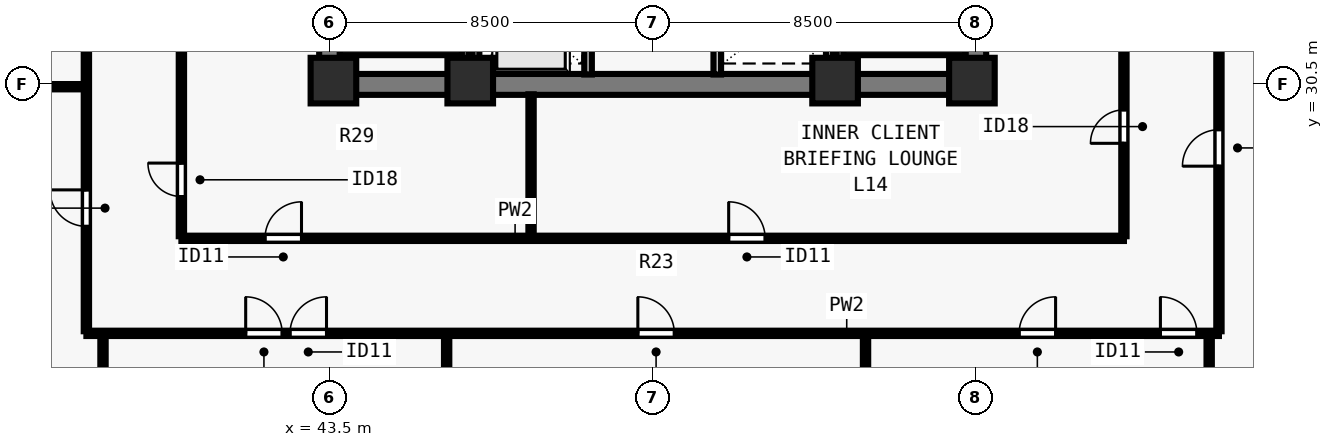
"""IFC4 building model, lengths in metres.
Left out: names, types, materials, properties, quantities, classifications, styles, units other than length and angle.
Written with IfcOpenShell. Run it as: python <this file> out.ifc"""

import sys

from ifc_helpers import new_model, si_unit, direction, frame, frame_2d, origin, origin_2d, place, context, subcontext, project, spatial, rectangle, extrude, element, fill, save


model = new_model("IFC4")
c1 = context("Model", 3, precision=1e-05, world=origin(), true_north=direction((0.0, 1.0)))
c2 = subcontext(c1, "Body", "Model", "MODEL_VIEW")
j1 = project(units=[si_unit("LENGTHUNIT", "METRE"), si_unit("PLANEANGLEUNIT", "RADIAN")], contexts=[c1])
p1 = place(None, origin())
s1 = spatial("IfcSite", under=j1, at=p1, CompositionType="ELEMENT")
p2 = place(p1, origin())
s2 = spatial("IfcBuilding", under=s1, at=p2, CompositionType="ELEMENT")
p3 = place(p2, frame((0.0, 0.0, 55.0)))
s3 = spatial("IfcBuildingStorey", under=s2, at=p3, CompositionType="ELEMENT", Elevation=55.0)
for number, where, z_axis, x_axis in (
    (1, (43.6, 30.6, 0.0), (0.0, 0.0, 1.0), (1.0, 0.0, 0.0)),
    (2, (47.2, 30.6, 0.0), (0.0, 0.0, 1.0), (1.0, 0.0, 0.0)),
    (3, (56.8, 30.6, 0.0), (0.0, 0.0, 1.0), (1.0, 0.0, 0.0)),
    (4, (60.4, 30.6, 0.0), (0.0, 0.0, 1.0), (1.0, 0.0, 0.0)),
):
    element("IfcColumn", number, at=place(p3, frame(where, z_axis=z_axis, x_axis=x_axis)), inside=s3, PredefinedType="COLUMN", context=c2, shape_type="SweptSolid", body=[
        extrude(rectangle(XDim=1.2, YDim=1.2, at=origin_2d()), origin(), (0.0, 0.0, 1.0), 3.5),
    ])
p4 = place(p3, frame((43.225, 30.5, 0.0), z_axis=(0.0, 0.0, 1.0), x_axis=(1.0, 0.0, 0.0)))
e5 = element("IfcWall", 5, at=p4, inside=s3, PredefinedType="SHEAR", context=c2, shape_type="SweptSolid", body=[
    extrude(rectangle(XDim=17.55, YDim=0.55, at=frame_2d((8.775, 0.0))), origin(), (0.0, 0.0, 1.0), 3.28),
])
for number, where, z_axis, x_axis in (
    (6, (43.5, 30.765, 0.0), (0.0, 0.0, 1.0), (0.0, 1.0, 0.0)),
    (7, (60.5, 30.765, 0.0), (0.0, 0.0, 1.0), (0.0, 1.0, 0.0)),
):
    element("IfcWall", number, at=place(p3, frame(where, z_axis=z_axis, x_axis=x_axis)), inside=s3, PredefinedType="SHEAR", context=c2, shape_type="SweptSolid", body=[
        extrude(rectangle(XDim=7.985, YDim=0.55, at=frame_2d((3.993, 0.0))), origin(), (0.0, 0.0, 1.0), 3.28),
    ])
p5 = place(p3, frame((50.3, 30.76, 0.0), z_axis=(0.0, 0.0, 1.0), x_axis=(0.0, 1.0, 0.0)))
e8 = element("IfcWall", 8, at=p5, inside=s3, PredefinedType="SOLIDWALL", context=c2, shape_type="SweptSolid", body=[
    extrude(rectangle(XDim=7.855, YDim=0.2, at=frame_2d((3.927, 0.0))), origin(), (0.0, 0.0, 1.0), 3.28),
])
p6 = place(p5, frame((0.79, 0.0, 0.0)))
e9 = element("IfcOpeningElement", 9, at=p6, cuts=e8, PredefinedType="OPENING", context=c2, shape_type="SweptSolid", body=[
    extrude(rectangle(XDim=1.1, YDim=2.2, at=frame_2d((0.55, 1.1))), frame((0.0, 0.11, 0.0), z_axis=(0.0, -1.0, 0.0), x_axis=(1.0, 0.0, 0.0)), (0.0, 0.0, 1.0), 0.22),
])
p7 = place(p5, frame((3.49, 0.0, 0.0)))
e10 = element("IfcOpeningElement", 10, at=p7, cuts=e8, PredefinedType="OPENING", context=c2, shape_type="SweptSolid", body=[
    extrude(rectangle(XDim=1.1, YDim=2.2, at=frame_2d((0.55, 1.1))), frame((0.0, 0.11, 0.0), z_axis=(0.0, -1.0, 0.0), x_axis=(1.0, 0.0, 0.0)), (0.0, 0.0, 1.0), 0.22),
])
p8 = place(p5, frame((6.19, 0.0, 0.0)))
e11 = element("IfcOpeningElement", 11, at=p8, cuts=e8, PredefinedType="OPENING", context=c2, shape_type="SweptSolid", body=[
    extrude(rectangle(XDim=1.1, YDim=2.2, at=frame_2d((0.55, 1.1))), frame((0.0, 0.11, 0.0), z_axis=(0.0, -1.0, 0.0), x_axis=(1.0, 0.0, 0.0)), (0.0, 0.0, 1.0), 0.22),
])
p9 = place(p3, frame((53.7, 30.76, 0.0), z_axis=(0.0, 0.0, 1.0), x_axis=(0.0, 1.0, 0.0)))
e12 = element("IfcWall", 12, at=p9, inside=s3, PredefinedType="SOLIDWALL", context=c2, shape_type="SweptSolid", body=[
    extrude(rectangle(XDim=7.855, YDim=0.2, at=frame_2d((3.927, 0.0))), origin(), (0.0, 0.0, 1.0), 3.28),
])
for number, where, z_axis, x_axis in (
    (13, (47.35, 30.76, 0.0), (0.0, 0.0, 1.0), (0.0, 1.0, 0.0)),
    (14, (56.65, 30.76, 0.0), (0.0, 0.0, 1.0), (0.0, 1.0, 0.0)),
):
    element("IfcWall", number, at=place(p3, frame(where, z_axis=z_axis, x_axis=x_axis)), inside=s3, PredefinedType="SOLIDWALL", context=c2, shape_type="SweptSolid", body=[
        extrude(rectangle(XDim=7.855, YDim=0.18, at=frame_2d((3.927, 0.0))), origin(), (0.0, 0.0, 1.0), 3.28),
    ])
p10 = place(p3, frame((37.1, 23.95, 0.0), z_axis=(0.0, 0.0, 1.0), x_axis=(1.0, 0.0, 0.0)))
e15 = element("IfcWall", 15, at=p10, inside=s3, PredefinedType="PARTITIONING", context=c2, shape_type="SweptSolid", body=[
    extrude(rectangle(XDim=29.8, YDim=0.14, at=frame_2d((14.9, 0.0))), origin(), (0.0, 0.0, 1.0), 3.28),
])
p11 = place(p10, frame((4.191, 0.0, 0.0)))
e16 = element("IfcOpeningElement", 16, at=p11, cuts=e15, PredefinedType="OPENING", context=c2, shape_type="SweptSolid", body=[
    extrude(rectangle(XDim=0.96, YDim=2.12, at=frame_2d((0.48, 1.06))), frame((0.0, 0.08, 0.0), z_axis=(0.0, -1.0, 0.0), x_axis=(1.0, 0.0, 0.0)), (0.0, 0.0, 1.0), 0.16),
])
p12 = place(p10, frame((5.358, 0.0, 0.0)))
e17 = element("IfcOpeningElement", 17, at=p12, cuts=e15, PredefinedType="OPENING", context=c2, shape_type="SweptSolid", body=[
    extrude(rectangle(XDim=0.96, YDim=2.12, at=frame_2d((0.48, 1.06))), frame((0.0, 0.08, 0.0), z_axis=(0.0, -1.0, 0.0), x_axis=(1.0, 0.0, 0.0)), (0.0, 0.0, 1.0), 0.16),
])
p13 = place(p10, frame((14.51, 0.0, 0.0)))
e18 = element("IfcOpeningElement", 18, at=p13, cuts=e15, PredefinedType="OPENING", context=c2, shape_type="SweptSolid", body=[
    extrude(rectangle(XDim=0.96, YDim=2.12, at=frame_2d((0.48, 1.06))), frame((0.0, 0.08, 0.0), z_axis=(0.0, -1.0, 0.0), x_axis=(1.0, 0.0, 0.0)), (0.0, 0.0, 1.0), 0.16),
])
p14 = place(p10, frame((24.542, 0.0, 0.0)))
e19 = element("IfcOpeningElement", 19, at=p14, cuts=e15, PredefinedType="OPENING", context=c2, shape_type="SweptSolid", body=[
    extrude(rectangle(XDim=0.96, YDim=2.12, at=frame_2d((0.48, 1.06))), frame((0.0, 0.08, 0.0), z_axis=(0.0, -1.0, 0.0), x_axis=(1.0, 0.0, 0.0)), (0.0, 0.0, 1.0), 0.16),
])
p15 = place(p10, frame((28.26, 0.0, 0.0)))
e20 = element("IfcOpeningElement", 20, at=p15, cuts=e15, PredefinedType="OPENING", context=c2, shape_type="SweptSolid", body=[
    extrude(rectangle(XDim=0.96, YDim=2.12, at=frame_2d((0.48, 1.06))), frame((0.0, 0.08, 0.0), z_axis=(0.0, -1.0, 0.0), x_axis=(1.0, 0.0, 0.0)), (0.0, 0.0, 1.0), 0.16),
])
p16 = place(p3, frame((37.1, 24.005, 0.0), z_axis=(0.0, 0.0, 1.0), x_axis=(0.0, 1.0, 0.0)))
e21 = element("IfcWall", 21, at=p16, inside=s3, PredefinedType="PARTITIONING", context=c2, shape_type="SweptSolid", body=[
    extrude(rectangle(XDim=29.99, YDim=0.14, at=frame_2d((14.995, 0.0))), origin(), (0.0, 0.0, 1.0), 3.28),
])
p17 = place(p16, frame((2.76, 0.0, 0.0)))
e22 = element("IfcOpeningElement", 22, at=p17, cuts=e21, PredefinedType="OPENING", context=c2, shape_type="SweptSolid", body=[
    extrude(rectangle(XDim=0.96, YDim=2.12, at=frame_2d((0.48, 1.06))), frame((0.0, 0.08, 0.0), z_axis=(0.0, -1.0, 0.0), x_axis=(1.0, 0.0, 0.0)), (0.0, 0.0, 1.0), 0.16),
])
p18 = place(p16, frame((8.598, 0.0, 0.0)))
e23 = element("IfcOpeningElement", 23, at=p18, cuts=e21, PredefinedType="OPENING", context=c2, shape_type="SweptSolid", body=[
    extrude(rectangle(XDim=0.96, YDim=2.12, at=frame_2d((0.48, 1.06))), frame((0.0, 0.08, 0.0), z_axis=(0.0, -1.0, 0.0), x_axis=(1.0, 0.0, 0.0)), (0.0, 0.0, 1.0), 0.16),
])
p19 = place(p16, frame((14.578, 0.0, 0.0)))
e24 = element("IfcOpeningElement", 24, at=p19, cuts=e21, PredefinedType="OPENING", context=c2, shape_type="SweptSolid", body=[
    extrude(rectangle(XDim=0.96, YDim=2.12, at=frame_2d((0.48, 1.06))), frame((0.0, 0.08, 0.0), z_axis=(0.0, -1.0, 0.0), x_axis=(1.0, 0.0, 0.0)), (0.0, 0.0, 1.0), 0.16),
])
p20 = place(p16, frame((20.558, 0.0, 0.0)))
e25 = element("IfcOpeningElement", 25, at=p20, cuts=e21, PredefinedType="OPENING", context=c2, shape_type="SweptSolid", body=[
    extrude(rectangle(XDim=0.96, YDim=2.12, at=frame_2d((0.48, 1.06))), frame((0.0, 0.08, 0.0), z_axis=(0.0, -1.0, 0.0), x_axis=(1.0, 0.0, 0.0)), (0.0, 0.0, 1.0), 0.16),
])
p21 = place(p16, frame((26.333, 0.0, 0.0)))
e26 = element("IfcOpeningElement", 26, at=p21, cuts=e21, PredefinedType="OPENING", context=c2, shape_type="SweptSolid", body=[
    extrude(rectangle(XDim=0.96, YDim=2.12, at=frame_2d((0.48, 1.06))), frame((0.0, 0.08, 0.0), z_axis=(0.0, -1.0, 0.0), x_axis=(1.0, 0.0, 0.0)), (0.0, 0.0, 1.0), 0.16),
])
p22 = place(p3, frame((66.9, 24.005, 0.0), z_axis=(0.0, 0.0, 1.0), x_axis=(0.0, 1.0, 0.0)))
e27 = element("IfcWall", 27, at=p22, inside=s3, PredefinedType="PARTITIONING", context=c2, shape_type="SweptSolid", body=[
    extrude(rectangle(XDim=29.99, YDim=0.14, at=frame_2d((14.995, 0.0))), origin(), (0.0, 0.0, 1.0), 3.28),
])
p23 = place(p22, frame((4.344, 0.0, 0.0)))
e28 = element("IfcOpeningElement", 28, at=p23, cuts=e27, PredefinedType="OPENING", context=c2, shape_type="SweptSolid", body=[
    extrude(rectangle(XDim=0.96, YDim=2.12, at=frame_2d((0.48, 1.06))), frame((0.0, 0.08, 0.0), z_axis=(0.0, -1.0, 0.0), x_axis=(1.0, 0.0, 0.0)), (0.0, 0.0, 1.0), 0.16),
])
p24 = place(p22, frame((14.452, 0.0, 0.0)))
e29 = element("IfcOpeningElement", 29, at=p24, cuts=e27, PredefinedType="OPENING", context=c2, shape_type="SweptSolid", body=[
    extrude(rectangle(XDim=0.96, YDim=2.12, at=frame_2d((0.48, 1.06))), frame((0.0, 0.08, 0.0), z_axis=(0.0, -1.0, 0.0), x_axis=(1.0, 0.0, 0.0)), (0.0, 0.0, 1.0), 0.16),
])
p25 = place(p22, frame((24.623, 0.0, 0.0)))
e30 = element("IfcOpeningElement", 30, at=p25, cuts=e27, PredefinedType="OPENING", context=c2, shape_type="SweptSolid", body=[
    extrude(rectangle(XDim=0.96, YDim=2.12, at=frame_2d((0.48, 1.06))), frame((0.0, 0.08, 0.0), z_axis=(0.0, -1.0, 0.0), x_axis=(1.0, 0.0, 0.0)), (0.0, 0.0, 1.0), 0.16),
])
p26 = place(p3, frame((39.6, 26.45, 0.0), z_axis=(0.0, 0.0, 1.0), x_axis=(1.0, 0.0, 0.0)))
e31 = element("IfcWall", 31, at=p26, inside=s3, PredefinedType="PARTITIONING", context=c2, shape_type="SweptSolid", body=[
    extrude(rectangle(XDim=24.8, YDim=0.14, at=frame_2d((12.4, 0.0))), origin(), (0.0, 0.0, 1.0), 3.28),
])
p27 = place(p26, frame((2.2, 0.0, 0.0)))
e32 = element("IfcOpeningElement", 32, at=p27, cuts=e31, PredefinedType="OPENING", context=c2, shape_type="SweptSolid", body=[
    extrude(rectangle(XDim=0.96, YDim=2.12, at=frame_2d((0.48, 1.06))), frame((0.0, 0.08, 0.0), z_axis=(0.0, -1.0, 0.0), x_axis=(1.0, 0.0, 0.0)), (0.0, 0.0, 1.0), 0.16),
])
p28 = place(p26, frame((14.4, 0.0, 0.0)))
e33 = element("IfcOpeningElement", 33, at=p28, cuts=e31, PredefinedType="OPENING", context=c2, shape_type="SweptSolid", body=[
    extrude(rectangle(XDim=0.96, YDim=2.12, at=frame_2d((0.48, 1.06))), frame((0.0, 0.08, 0.0), z_axis=(0.0, -1.0, 0.0), x_axis=(1.0, 0.0, 0.0)), (0.0, 0.0, 1.0), 0.16),
])
p29 = place(p3, frame((39.6, 26.505, 0.0), z_axis=(0.0, 0.0, 1.0), x_axis=(0.0, 1.0, 0.0)))
e34 = element("IfcWall", 34, at=p29, inside=s3, PredefinedType="PARTITIONING", context=c2, shape_type="SweptSolid", body=[
    extrude(rectangle(XDim=12.245, YDim=0.14, at=frame_2d((6.123, 0.0))), origin(), (0.0, 0.0, 1.0), 3.28),
])
p30 = place(p29, frame((1.045, 0.0, 0.0)))
e35 = element("IfcOpeningElement", 35, at=p30, cuts=e34, PredefinedType="OPENING", context=c2, shape_type="SweptSolid", body=[
    extrude(rectangle(XDim=0.88, YDim=2.1, at=frame_2d((0.44, 1.05))), frame((0.0, 0.08, 0.0), z_axis=(0.0, -1.0, 0.0), x_axis=(1.0, 0.0, 0.0)), (0.0, 0.0, 1.0), 0.16),
])
p31 = place(p29, frame((9.295, 0.0, 0.0)))
e36 = element("IfcOpeningElement", 36, at=p31, cuts=e34, PredefinedType="OPENING", context=c2, shape_type="SweptSolid", body=[
    extrude(rectangle(XDim=0.88, YDim=2.1, at=frame_2d((0.44, 1.05))), frame((0.0, 0.08, 0.0), z_axis=(0.0, -1.0, 0.0), x_axis=(1.0, 0.0, 0.0)), (0.0, 0.0, 1.0), 0.16),
])
p32 = place(p3, frame((64.4, 26.505, 0.0), z_axis=(0.0, 0.0, 1.0), x_axis=(0.0, 1.0, 0.0)))
e37 = element("IfcWall", 37, at=p32, inside=s3, PredefinedType="PARTITIONING", context=c2, shape_type="SweptSolid", body=[
    extrude(rectangle(XDim=12.245, YDim=0.14, at=frame_2d((6.123, 0.0))), origin(), (0.0, 0.0, 1.0), 3.28),
])
p33 = place(p32, frame((2.445, 0.0, 0.0)))
e38 = element("IfcOpeningElement", 38, at=p33, cuts=e37, PredefinedType="OPENING", context=c2, shape_type="SweptSolid", body=[
    extrude(rectangle(XDim=0.88, YDim=2.1, at=frame_2d((0.44, 1.05))), frame((0.0, 0.08, 0.0), z_axis=(0.0, -1.0, 0.0), x_axis=(1.0, 0.0, 0.0)), (0.0, 0.0, 1.0), 0.16),
])
p34 = place(p3, frame((48.8, 26.505, 0.0), z_axis=(0.0, 0.0, 1.0), x_axis=(0.0, 1.0, 0.0)))
e39 = element("IfcWall", 39, at=p34, inside=s3, PredefinedType="PARTITIONING", context=c2, shape_type="SweptSolid", body=[
    extrude(rectangle(XDim=3.735, YDim=0.14, at=frame_2d((1.868, 0.0))), origin(), (0.0, 0.0, 1.0), 3.28),
])
p35 = place(p3, frame((37.537, 13.92, 0.0), z_axis=(0.0, 0.0, 1.0), x_axis=(0.0, 1.0, 0.0)))
e40 = element("IfcWall", 40, at=p35, inside=s3, PredefinedType="PARTITIONING", context=c2, shape_type="SweptSolid", body=[
    extrude(rectangle(XDim=9.93, YDim=0.14, at=frame_2d((4.965, 0.0))), origin(), (0.0, 0.0, 1.0), 2.439),
])
for number, where, z_axis, x_axis in (
    (41, (46.579, 13.92, 0.0), (0.0, 0.0, 1.0), (0.0, 1.0, 0.0)),
    (42, (57.601, 13.92, 0.0), (0.0, 0.0, 1.0), (0.0, 1.0, 0.0)),
):
    element("IfcWall", number, at=place(p3, frame(where, z_axis=z_axis, x_axis=x_axis)), inside=s3, PredefinedType="PARTITIONING", context=c2, shape_type="SweptSolid", body=[
        extrude(rectangle(XDim=9.93, YDim=0.14, at=frame_2d((4.965, 0.0))), origin(), (0.0, 0.0, 1.0), 3.28),
    ])
p36 = place(p3, frame((66.643, 13.92, 0.0), z_axis=(0.0, 0.0, 1.0), x_axis=(0.0, 1.0, 0.0)))
e43 = element("IfcWall", 43, at=p36, inside=s3, PredefinedType="PARTITIONING", context=c2, shape_type="SweptSolid", body=[
    extrude(rectangle(XDim=9.93, YDim=0.14, at=frame_2d((4.965, 0.0))), origin(), (0.0, 0.0, 1.0), 2.439),
])
p37 = place(p3, frame((26.92, 30.439, 0.0), z_axis=(0.0, 0.0, 1.0), x_axis=(1.0, 0.0, 0.0)))
e44 = element("IfcWall", 44, at=p37, inside=s3, PredefinedType="PARTITIONING", context=c2, shape_type="SweptSolid", body=[
    extrude(rectangle(XDim=10.08, YDim=0.14, at=frame_2d((5.04, 0.0))), origin(), (0.0, 0.0, 1.0), 3.28),
])
p38 = place(p3, frame((43.765, 31.36, 0.0), z_axis=(0.0, 0.0, 1.0), x_axis=(1.0, 0.0, 0.0)))
e45 = element("IfcWall", 45, at=p38, inside=s3, PredefinedType="SOLIDWALL", context=c2, shape_type="SweptSolid", body=[
    extrude(rectangle(XDim=3.23, YDim=0.18, at=frame_2d((1.615, 0.0))), origin(), (0.0, 0.0, 1.0), 3.28),
])
p39 = place(p3, frame((47.07, 38.78, 0.0), z_axis=(0.0, 0.0, 1.0), x_axis=(0.0, -1.0, 0.0)))
e46 = element("IfcWall", 46, at=p39, inside=s3, PredefinedType="SOLIDWALL", context=c2, shape_type="SweptSolid", body=[
    extrude(rectangle(XDim=8.017, YDim=0.18, at=frame_2d((4.009, 0.0))), origin(), (0.0, 0.0, 1.0), 3.28),
])
p40 = place(p3, frame((57.005, 31.36, 0.0), z_axis=(0.0, 0.0, 1.0), x_axis=(1.0, 0.0, 0.0)))
e47 = element("IfcWall", 47, at=p40, inside=s3, PredefinedType="SOLIDWALL", context=c2, shape_type="SweptSolid", body=[
    extrude(rectangle(XDim=3.23, YDim=0.18, at=frame_2d((1.615, 0.0))), origin(), (0.0, 0.0, 1.0), 3.28),
])
p41 = place(p3, frame((56.93, 38.78, 0.0), z_axis=(0.0, 0.0, 1.0), x_axis=(0.0, -1.0, 0.0)))
e48 = element("IfcWall", 48, at=p41, inside=s3, PredefinedType="SOLIDWALL", context=c2, shape_type="SweptSolid", body=[
    extrude(rectangle(XDim=8.017, YDim=0.18, at=frame_2d((4.009, 0.0))), origin(), (0.0, 0.0, 1.0), 3.28),
])
p42 = place(p27, origin())
e49 = element("IfcDoor", 49, at=p42, inside=s3, OperationType="SINGLE_SWING_RIGHT", PredefinedType="DOOR", context=c2, shape_type="SweptSolid", body=[
    extrude(rectangle(XDim=0.96, YDim=2.12, at=frame_2d((0.48, 1.06))), frame((0.0, 0.025, 0.0), z_axis=(0.0, -1.0, 0.0), x_axis=(1.0, 0.0, 0.0)), (0.0, 0.0, 1.0), 0.05),
])
fill(e32, e49)
p43 = place(p28, origin())
e50 = element("IfcDoor", 50, at=p43, inside=s3, OperationType="SINGLE_SWING_LEFT", PredefinedType="DOOR", context=c2, shape_type="SweptSolid", body=[
    extrude(rectangle(XDim=0.96, YDim=2.12, at=frame_2d((0.48, 1.06))), frame((0.0, 0.025, 0.0), z_axis=(0.0, -1.0, 0.0), x_axis=(1.0, 0.0, 0.0)), (0.0, 0.0, 1.0), 0.05),
])
fill(e33, e50)
p44 = place(p30, origin())
e51 = element("IfcDoor", 51, at=p44, inside=s3, OperationType="SINGLE_SWING_RIGHT", PredefinedType="DOOR", context=c2, shape_type="SweptSolid", body=[
    extrude(rectangle(XDim=0.88, YDim=2.1, at=frame_2d((0.44, 1.05))), frame((0.0, 0.025, 0.0), z_axis=(0.0, -1.0, 0.0), x_axis=(1.0, 0.0, 0.0)), (0.0, 0.0, 1.0), 0.05),
])
fill(e35, e51)
p45 = place(p33, origin())
e52 = element("IfcDoor", 52, at=p45, inside=s3, OperationType="SINGLE_SWING_LEFT", PredefinedType="DOOR", context=c2, shape_type="SweptSolid", body=[
    extrude(rectangle(XDim=0.88, YDim=2.1, at=frame_2d((0.44, 1.05))), frame((0.0, 0.025, 0.0), z_axis=(0.0, -1.0, 0.0), x_axis=(1.0, 0.0, 0.0)), (0.0, 0.0, 1.0), 0.05),
])
fill(e38, e52)
p46 = place(p11, origin())
e53 = element("IfcDoor", 53, at=p46, inside=s3, OperationType="SINGLE_SWING_LEFT", PredefinedType="DOOR", context=c2, shape_type="SweptSolid", body=[
    extrude(rectangle(XDim=0.96, YDim=2.12, at=frame_2d((0.48, 1.06))), frame((0.0, 0.025, 0.0), z_axis=(0.0, -1.0, 0.0), x_axis=(1.0, 0.0, 0.0)), (0.0, 0.0, 1.0), 0.05),
])
fill(e16, e53)
p47 = place(p12, origin())
e54 = element("IfcDoor", 54, at=p47, inside=s3, OperationType="SINGLE_SWING_RIGHT", PredefinedType="DOOR", context=c2, shape_type="SweptSolid", body=[
    extrude(rectangle(XDim=0.96, YDim=2.12, at=frame_2d((0.48, 1.06))), frame((0.0, 0.025, 0.0), z_axis=(0.0, -1.0, 0.0), x_axis=(1.0, 0.0, 0.0)), (0.0, 0.0, 1.0), 0.05),
])
fill(e17, e54)
p48 = place(p13, origin())
e55 = element("IfcDoor", 55, at=p48, inside=s3, OperationType="SINGLE_SWING_LEFT", PredefinedType="DOOR", context=c2, shape_type="SweptSolid", body=[
    extrude(rectangle(XDim=0.96, YDim=2.12, at=frame_2d((0.48, 1.06))), frame((0.0, 0.025, 0.0), z_axis=(0.0, -1.0, 0.0), x_axis=(1.0, 0.0, 0.0)), (0.0, 0.0, 1.0), 0.05),
])
fill(e18, e55)
p49 = place(p14, origin())
e56 = element("IfcDoor", 56, at=p49, inside=s3, OperationType="SINGLE_SWING_RIGHT", PredefinedType="DOOR", context=c2, shape_type="SweptSolid", body=[
    extrude(rectangle(XDim=0.96, YDim=2.12, at=frame_2d((0.48, 1.06))), frame((0.0, 0.025, 0.0), z_axis=(0.0, -1.0, 0.0), x_axis=(1.0, 0.0, 0.0)), (0.0, 0.0, 1.0), 0.05),
])
fill(e19, e56)
p50 = place(p15, origin())
e57 = element("IfcDoor", 57, at=p50, inside=s3, OperationType="SINGLE_SWING_LEFT", PredefinedType="DOOR", context=c2, shape_type="SweptSolid", body=[
    extrude(rectangle(XDim=0.96, YDim=2.12, at=frame_2d((0.48, 1.06))), frame((0.0, 0.025, 0.0), z_axis=(0.0, -1.0, 0.0), x_axis=(1.0, 0.0, 0.0)), (0.0, 0.0, 1.0), 0.05),
])
fill(e20, e57)
p51 = place(p17, origin())
e58 = element("IfcDoor", 58, at=p51, inside=s3, OperationType="SINGLE_SWING_RIGHT", PredefinedType="DOOR", context=c2, shape_type="SweptSolid", body=[
    extrude(rectangle(XDim=0.96, YDim=2.12, at=frame_2d((0.48, 1.06))), frame((0.0, 0.025, 0.0), z_axis=(0.0, -1.0, 0.0), x_axis=(1.0, 0.0, 0.0)), (0.0, 0.0, 1.0), 0.05),
])
fill(e22, e58)
p52 = place(p23, origin())
e59 = element("IfcDoor", 59, at=p52, inside=s3, OperationType="SINGLE_SWING_LEFT", PredefinedType="DOOR", context=c2, shape_type="SweptSolid", body=[
    extrude(rectangle(XDim=0.96, YDim=2.12, at=frame_2d((0.48, 1.06))), frame((0.0, 0.025, 0.0), z_axis=(0.0, -1.0, 0.0), x_axis=(1.0, 0.0, 0.0)), (0.0, 0.0, 1.0), 0.05),
])
fill(e28, e59)
save(model, sys.argv[1])
